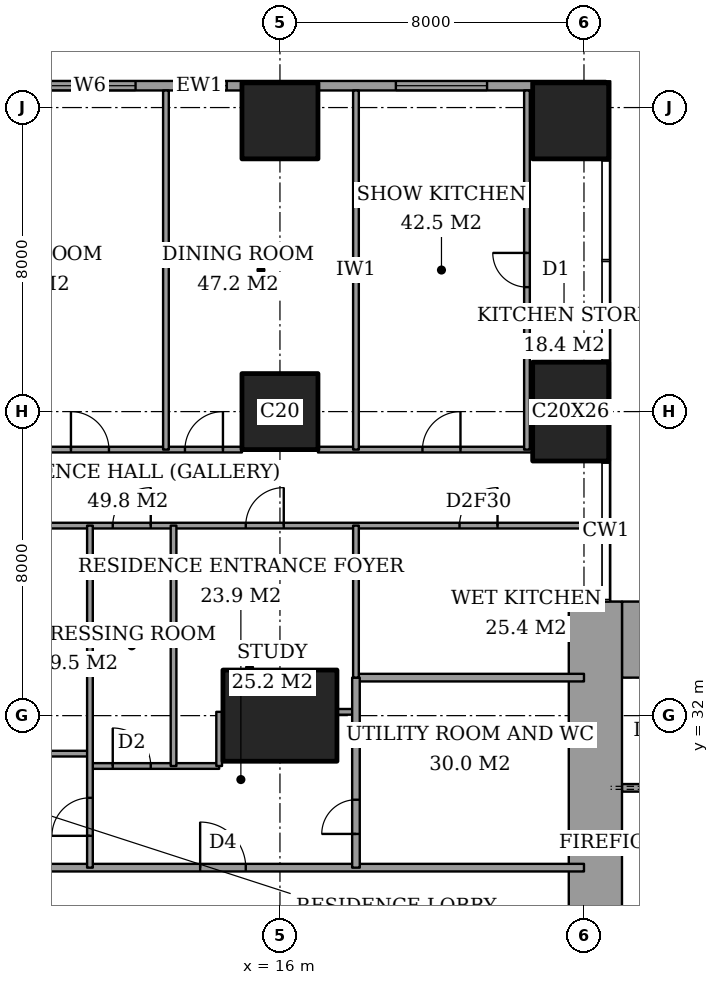
"""IFC4 building model, lengths in metres.
Left out: names, types, materials, properties, quantities, classifications, styles, units other than length and angle.
Written with IfcOpenShell. Run it as: python <this file> out.ifc"""

import sys

from ifc_helpers import new_model, si_unit, direction, frame, frame_2d, origin, origin_2d, place, context, subcontext, project, spatial, rectangle, extrude, element, fill, save


model = new_model("IFC4")
c1 = context("Model", 3, precision=1e-05, world=origin(), true_north=direction((0.0, 1.0)))
c2 = subcontext(c1, "Body", "Model", "MODEL_VIEW")
j1 = project(units=[si_unit("LENGTHUNIT", "METRE"), si_unit("PLANEANGLEUNIT", "RADIAN")], contexts=[c1])
p1 = place(None, origin())
s1 = spatial("IfcSite", under=j1, at=p1, CompositionType="ELEMENT")
p2 = place(p1, origin())
s2 = spatial("IfcBuilding", under=s1, at=p2, CompositionType="ELEMENT")
p3 = place(p2, frame((0.0, 0.0, 29.6)))
s3 = spatial("IfcBuildingStorey", under=s2, at=p3, CompositionType="ELEMENT", Elevation=29.6)
p4 = place(p3, frame((16.0, 32.0, 0.0), z_axis=(0.0, 0.0, 1.0), x_axis=(1.0, 0.0, 0.0)))
e1 = element("IfcColumn", 1, at=p4, inside=s3, PredefinedType="COLUMN", context=c2, shape_type="SweptSolid", body=[
    extrude(rectangle(XDim=3.0, YDim=2.4, at=origin_2d()), origin(), (0.0, 0.0, 1.0), 3.6),
])
for number, where, z_axis, x_axis in (
    (2, (16.0, 40.0, 0.0), (0.0, 0.0, 1.0), (1.0, 0.0, 0.0)),
    (3, (16.0, 47.65, 0.0), (0.0, 0.0, 1.0), (1.0, 0.0, 0.0)),
):
    element("IfcColumn", number, at=place(p3, frame(where, z_axis=z_axis, x_axis=x_axis)), inside=s3, PredefinedType="COLUMN", context=c2, shape_type="SweptSolid", body=[
        extrude(rectangle(XDim=2.0, YDim=2.0, at=origin_2d()), origin(), (0.0, 0.0, 1.0), 3.6),
    ])
p5 = place(p3, frame((23.65, 40.0, 0.0), z_axis=(0.0, 0.0, 1.0), x_axis=(1.0, 0.0, 0.0)))
e4 = element("IfcColumn", 4, at=p5, inside=s3, PredefinedType="COLUMN", context=c2, shape_type="SweptSolid", body=[
    extrude(rectangle(XDim=2.0, YDim=2.6, at=origin_2d()), origin(), (0.0, 0.0, 1.0), 3.6),
])
p6 = place(p3, frame((23.65, 47.65, 0.0), z_axis=(0.0, 0.0, 1.0), x_axis=(1.0, 0.0, 0.0)))
e5 = element("IfcColumn", 5, at=p6, inside=s3, PredefinedType="COLUMN", context=c2, shape_type="SweptSolid", body=[
    extrude(rectangle(XDim=2.0, YDim=2.0, at=origin_2d()), origin(), (0.0, 0.0, 1.0), 3.6),
])
p7 = place(p3, frame((25.0, 34.0, 0.0), z_axis=(0.0, 0.0, 1.0), x_axis=(1.0, 0.0, 0.0)))
e6 = element("IfcWall", 6, at=p7, inside=s3, PredefinedType="SHEAR", context=c2, shape_type="SweptSolid", body=[
    extrude(rectangle(XDim=3.15, YDim=2.0, at=frame_2d((1.575, 0.0))), origin(), (0.0, 0.0, 1.0), 3.6),
])
p8 = place(p3, frame((24.3, 23.15, 0.0), z_axis=(0.0, 0.0, 1.0), x_axis=(0.0, 1.0, 0.0)))
e7 = element("IfcWall", 7, at=p8, inside=s3, PredefinedType="SHEAR", context=c2, shape_type="SweptSolid", body=[
    extrude(rectangle(XDim=11.85, YDim=1.4, at=frame_2d((5.925, 0.0))), origin(), (0.0, 0.0, 1.0), 3.6),
])
p9 = place(p8, frame((0.75, 0.0, 0.0)))
e8 = element("IfcOpeningElement", 8, at=p9, cuts=e7, PredefinedType="OPENING", context=c2, shape_type="SweptSolid", body=[
    extrude(rectangle(XDim=1.8, YDim=2.4, at=frame_2d((0.9, 1.2))), frame((0.0, 0.71, 0.0), z_axis=(0.0, -1.0, 0.0), x_axis=(1.0, 0.0, 0.0)), (0.0, 0.0, 1.0), 1.42),
])
p10 = place(p3, frame((24.575, 48.575, 0.0), z_axis=(0.0, 0.0, 1.0), x_axis=(-1.0, 0.0, 0.0)))
e9 = element("IfcWall", 9, at=p10, inside=s3, PredefinedType="SOLIDWALL", context=c2, shape_type="SweptSolid", body=[
    extrude(rectangle(XDim=21.4, YDim=0.25, at=frame_2d((10.7, 0.0))), origin(), (0.0, 0.0, 1.0), 3.6),
])
p11 = place(p10, frame((3.125, 0.0, 0.6)))
e10 = element("IfcOpeningElement", 10, at=p11, cuts=e9, PredefinedType="OPENING", context=c2, shape_type="SweptSolid", body=[
    extrude(rectangle(XDim=2.4, YDim=2.0, at=frame_2d((1.2, 1.0))), frame((0.0, 0.135, 0.0), z_axis=(0.0, -1.0, 0.0), x_axis=(1.0, 0.0, 0.0)), (0.0, 0.0, 1.0), 0.27),
])
p12 = place(p10, frame((9.975, 0.0, 0.6)))
e11 = element("IfcOpeningElement", 11, at=p12, cuts=e9, PredefinedType="OPENING", context=c2, shape_type="SweptSolid", body=[
    extrude(rectangle(XDim=1.2, YDim=2.0, at=frame_2d((0.6, 1.0))), frame((0.0, 0.135, 0.0), z_axis=(0.0, -1.0, 0.0), x_axis=(1.0, 0.0, 0.0)), (0.0, 0.0, 1.0), 0.27),
])
p13 = place(p10, frame((12.375, 0.0, 0.6)))
e12 = element("IfcOpeningElement", 12, at=p13, cuts=e9, PredefinedType="OPENING", context=c2, shape_type="SweptSolid", body=[
    extrude(rectangle(XDim=2.4, YDim=2.0, at=frame_2d((1.2, 1.0))), frame((0.0, 0.135, 0.0), z_axis=(0.0, -1.0, 0.0), x_axis=(1.0, 0.0, 0.0)), (0.0, 0.0, 1.0), 0.27),
])
p14 = place(p10, frame((19.425, 0.0, 0.6)))
e13 = element("IfcOpeningElement", 13, at=p14, cuts=e9, PredefinedType="OPENING", context=c2, shape_type="SweptSolid", body=[
    extrude(rectangle(XDim=1.2, YDim=2.0, at=frame_2d((0.6, 1.0))), frame((0.0, 0.135, 0.0), z_axis=(0.0, -1.0, 0.0), x_axis=(1.0, 0.0, 0.0)), (0.0, 0.0, 1.0), 0.27),
])
p15 = place(p3, frame((6.725, 28.0, 0.0), z_axis=(0.0, 0.0, 1.0), x_axis=(1.0, 0.0, 0.0)))
e14 = element("IfcWall", 14, at=p15, inside=s3, PredefinedType="PARTITIONING", context=c2, shape_type="SweptSolid", body=[
    extrude(rectangle(XDim=17.275, YDim=0.2, at=frame_2d((8.637, 0.0))), origin(), (0.0, 0.0, 1.0), 3.35),
])
p16 = place(p15, frame((7.175, 0.0, 0.0)))
e15 = element("IfcOpeningElement", 15, at=p16, cuts=e14, PredefinedType="OPENING", context=c2, shape_type="SweptSolid", body=[
    extrude(rectangle(XDim=1.2, YDim=2.4, at=frame_2d((0.6, 1.2))), frame((0.0, 0.11, 0.0), z_axis=(0.0, -1.0, 0.0), x_axis=(1.0, 0.0, 0.0)), (0.0, 0.0, 1.0), 0.22),
])
p17 = place(p3, frame((11.0, 30.675, 0.0), z_axis=(0.0, 0.0, 1.0), x_axis=(1.0, 0.0, 0.0)))
e16 = element("IfcWall", 16, at=p17, inside=s3, PredefinedType="PARTITIONING", context=c2, shape_type="SweptSolid", body=[
    extrude(rectangle(XDim=3.4, YDim=0.15, at=frame_2d((1.7, 0.0))), origin(), (0.0, 0.0, 1.0), 3.35),
])
p18 = place(p17, frame((0.6, 0.0, 0.0)))
e17 = element("IfcOpeningElement", 17, at=p18, cuts=e16, PredefinedType="OPENING", context=c2, shape_type="SweptSolid", body=[
    extrude(rectangle(XDim=1.0, YDim=2.1, at=frame_2d((0.5, 1.05))), frame((0.0, 0.085, 0.0), z_axis=(0.0, -1.0, 0.0), x_axis=(1.0, 0.0, 0.0)), (0.0, 0.0, 1.0), 0.17),
])
p19 = place(p3, frame((9.5, 31.0, 0.0), z_axis=(0.0, 0.0, 1.0), x_axis=(1.0, 0.0, 0.0)))
e18 = element("IfcWall", 18, at=p19, inside=s3, PredefinedType="PARTITIONING", context=c2, shape_type="SweptSolid", body=[
    extrude(rectangle(XDim=1.5, YDim=0.15, at=frame_2d((0.75, 0.0))), origin(), (0.0, 0.0, 1.0), 3.35),
])
p20 = place(p3, frame((17.5, 32.1, 0.0), z_axis=(0.0, 0.0, 1.0), x_axis=(1.0, 0.0, 0.0)))
e19 = element("IfcWall", 19, at=p20, inside=s3, PredefinedType="PARTITIONING", context=c2, shape_type="SweptSolid", body=[
    extrude(rectangle(XDim=0.5, YDim=0.15, at=frame_2d((0.25, 0.0))), origin(), (0.0, 0.0, 1.0), 2.634),
])
p21 = place(p3, frame((18.0, 33.0, 0.0), z_axis=(0.0, 0.0, 1.0), x_axis=(1.0, 0.0, 0.0)))
e20 = element("IfcWall", 20, at=p21, inside=s3, PredefinedType="PARTITIONING", context=c2, shape_type="SweptSolid", body=[
    extrude(rectangle(XDim=6.0, YDim=0.2, at=frame_2d((3.0, 0.0))), origin(), (0.0, 0.0, 1.0), 3.35),
])
p22 = place(p3, frame((-0.45, 37.0, 0.0), z_axis=(0.0, 0.0, 1.0), x_axis=(1.0, 0.0, 0.0)))
e21 = element("IfcWall", 21, at=p22, inside=s3, PredefinedType="PARTITIONING", context=c2, shape_type="SweptSolid", body=[
    extrude(rectangle(XDim=25.011, YDim=0.15, at=frame_2d((12.505, 0.0))), origin(), (0.0, 0.0, 1.0), 3.35),
])
p23 = place(p22, frame((12.05, 0.0, 0.0)))
e22 = element("IfcOpeningElement", 22, at=p23, cuts=e21, PredefinedType="OPENING", context=c2, shape_type="SweptSolid", body=[
    extrude(rectangle(XDim=1.0, YDim=2.1, at=frame_2d((0.5, 1.05))), frame((0.0, 0.085, 0.0), z_axis=(0.0, -1.0, 0.0), x_axis=(1.0, 0.0, 0.0)), (0.0, 0.0, 1.0), 0.17),
])
p24 = place(p22, frame((3.087, 0.0, 0.0)))
e23 = element("IfcOpeningElement", 23, at=p24, cuts=e21, PredefinedType="OPENING", context=c2, shape_type="SweptSolid", body=[
    extrude(rectangle(XDim=1.0, YDim=2.1, at=frame_2d((0.5, 1.05))), frame((0.0, 0.085, 0.0), z_axis=(0.0, -1.0, 0.0), x_axis=(1.0, 0.0, 0.0)), (0.0, 0.0, 1.0), 0.17),
])
p25 = place(p22, frame((15.55, 0.0, 0.0)))
e24 = element("IfcOpeningElement", 24, at=p25, cuts=e21, PredefinedType="OPENING", context=c2, shape_type="SweptSolid", body=[
    extrude(rectangle(XDim=1.0, YDim=2.1, at=frame_2d((0.5, 1.05))), frame((0.0, 0.085, 0.0), z_axis=(0.0, -1.0, 0.0), x_axis=(1.0, 0.0, 0.0)), (0.0, 0.0, 1.0), 0.17),
])
p26 = place(p22, frame((21.175, 0.0, 0.0)))
e25 = element("IfcOpeningElement", 25, at=p26, cuts=e21, PredefinedType="OPENING", context=c2, shape_type="SweptSolid", body=[
    extrude(rectangle(XDim=1.0, YDim=2.1, at=frame_2d((0.5, 1.05))), frame((0.0, 0.085, 0.0), z_axis=(0.0, -1.0, 0.0), x_axis=(1.0, 0.0, 0.0)), (0.0, 0.0, 1.0), 0.17),
])
p27 = place(p3, frame((9.0, 39.0, 0.0), z_axis=(0.0, 0.0, 1.0), x_axis=(1.0, 0.0, 0.0)))
e26 = element("IfcWall", 26, at=p27, inside=s3, PredefinedType="PARTITIONING", context=c2, shape_type="SweptSolid", body=[
    extrude(rectangle(XDim=6.0, YDim=0.15, at=frame_2d((3.0, 0.0))), origin(), (0.0, 0.0, 1.0), 3.35),
])
p28 = place(p27, frame((1.5, 0.0, 0.0)))
e27 = element("IfcOpeningElement", 27, at=p28, cuts=e26, PredefinedType="OPENING", context=c2, shape_type="SweptSolid", body=[
    extrude(rectangle(XDim=1.0, YDim=2.1, at=frame_2d((0.5, 1.05))), frame((0.0, 0.085, 0.0), z_axis=(0.0, -1.0, 0.0), x_axis=(1.0, 0.0, 0.0)), (0.0, 0.0, 1.0), 0.17),
])
p29 = place(p27, frame((4.5, 0.0, 0.0)))
e28 = element("IfcOpeningElement", 28, at=p29, cuts=e26, PredefinedType="OPENING", context=c2, shape_type="SweptSolid", body=[
    extrude(rectangle(XDim=1.0, YDim=2.1, at=frame_2d((0.5, 1.05))), frame((0.0, 0.085, 0.0), z_axis=(0.0, -1.0, 0.0), x_axis=(1.0, 0.0, 0.0)), (0.0, 0.0, 1.0), 0.17),
])
p30 = place(p3, frame((17.0, 39.0, 0.0), z_axis=(0.0, 0.0, 1.0), x_axis=(1.0, 0.0, 0.0)))
e29 = element("IfcWall", 29, at=p30, inside=s3, PredefinedType="PARTITIONING", context=c2, shape_type="SweptSolid", body=[
    extrude(rectangle(XDim=5.65, YDim=0.15, at=frame_2d((2.825, 0.0))), origin(), (0.0, 0.0, 1.0), 3.35),
])
p31 = place(p30, frame((2.75, 0.0, 0.0)))
e30 = element("IfcOpeningElement", 30, at=p31, cuts=e29, PredefinedType="OPENING", context=c2, shape_type="SweptSolid", body=[
    extrude(rectangle(XDim=1.0, YDim=2.1, at=frame_2d((0.5, 1.05))), frame((0.0, 0.085, 0.0), z_axis=(0.0, -1.0, 0.0), x_axis=(1.0, 0.0, 0.0)), (0.0, 0.0, 1.0), 0.17),
])
p32 = place(p3, frame((11.0, 28.0, 0.0), z_axis=(0.0, 0.0, 1.0), x_axis=(0.0, 1.0, 0.0)))
e31 = element("IfcWall", 31, at=p32, inside=s3, PredefinedType="PARTITIONING", context=c2, shape_type="SweptSolid", body=[
    extrude(rectangle(XDim=9.0, YDim=0.15, at=frame_2d((4.5, 0.0))), origin(), (0.0, 0.0, 1.0), 3.35),
])
p33 = place(p32, frame((0.837, 0.0, 0.0)))
e32 = element("IfcOpeningElement", 32, at=p33, cuts=e31, PredefinedType="OPENING", context=c2, shape_type="SweptSolid", body=[
    extrude(rectangle(XDim=1.0, YDim=2.1, at=frame_2d((0.5, 1.05))), frame((0.0, 0.085, 0.0), z_axis=(0.0, -1.0, 0.0), x_axis=(1.0, 0.0, 0.0)), (0.0, 0.0, 1.0), 0.17),
])
p34 = place(p3, frame((13.0, 39.0, 0.0), z_axis=(0.0, 0.0, 1.0), x_axis=(0.0, 1.0, 0.0)))
e33 = element("IfcWall", 33, at=p34, inside=s3, PredefinedType="PARTITIONING", context=c2, shape_type="SweptSolid", body=[
    extrude(rectangle(XDim=9.45, YDim=0.15, at=frame_2d((4.725, 0.0))), origin(), (0.0, 0.0, 1.0), 3.35),
])
p35 = place(p3, frame((13.2, 30.675, 0.0), z_axis=(0.0, 0.0, 1.0), x_axis=(0.0, 1.0, 0.0)))
e34 = element("IfcWall", 34, at=p35, inside=s3, PredefinedType="PARTITIONING", context=c2, shape_type="SweptSolid", body=[
    extrude(rectangle(XDim=6.325, YDim=0.15, at=frame_2d((3.163, 0.0))), origin(), (0.0, 0.0, 1.0), 3.35),
])
p36 = place(p3, frame((14.4, 30.675, 0.0), z_axis=(0.0, 0.0, 1.0), x_axis=(0.0, 1.0, 0.0)))
e35 = element("IfcWall", 35, at=p36, inside=s3, PredefinedType="PARTITIONING", context=c2, shape_type="SweptSolid", body=[
    extrude(rectangle(XDim=1.425, YDim=0.15, at=frame_2d((0.712, 0.0))), origin(), (0.0, 0.0, 1.0), 3.35),
])
p37 = place(p3, frame((18.0, 28.0, 0.0), z_axis=(0.0, 0.0, 1.0), x_axis=(0.0, 1.0, 0.0)))
e36 = element("IfcWall", 36, at=p37, inside=s3, PredefinedType="PARTITIONING", context=c2, shape_type="SweptSolid", body=[
    extrude(rectangle(XDim=5.0, YDim=0.2, at=frame_2d((2.5, 0.0))), origin(), (0.0, 0.0, 1.0), 3.35),
])
p38 = place(p37, frame((0.887, 0.0, 0.0)))
e37 = element("IfcOpeningElement", 37, at=p38, cuts=e36, PredefinedType="OPENING", context=c2, shape_type="SweptSolid", body=[
    extrude(rectangle(XDim=0.9, YDim=2.1, at=frame_2d((0.45, 1.05))), frame((0.0, 0.11, 0.0), z_axis=(0.0, -1.0, 0.0), x_axis=(1.0, 0.0, 0.0)), (0.0, 0.0, 1.0), 0.22),
])
p39 = place(p3, frame((18.0, 33.0, 0.0), z_axis=(0.0, 0.0, 1.0), x_axis=(0.0, 1.0, 0.0)))
e38 = element("IfcWall", 38, at=p39, inside=s3, PredefinedType="PARTITIONING", context=c2, shape_type="SweptSolid", body=[
    extrude(rectangle(XDim=4.0, YDim=0.15, at=frame_2d((2.0, 0.0))), origin(), (0.0, 0.0, 1.0), 3.35),
])
p40 = place(p3, frame((18.0, 39.0, 0.0), z_axis=(0.0, 0.0, 1.0), x_axis=(0.0, 1.0, 0.0)))
e39 = element("IfcWall", 39, at=p40, inside=s3, PredefinedType="PARTITIONING", context=c2, shape_type="SweptSolid", body=[
    extrude(rectangle(XDim=9.45, YDim=0.15, at=frame_2d((4.725, 0.0))), origin(), (0.0, 0.0, 1.0), 3.35),
])
p41 = place(p3, frame((22.5, 39.0, 0.0), z_axis=(0.0, 0.0, 1.0), x_axis=(0.0, 1.0, 0.0)))
e40 = element("IfcWall", 40, at=p41, inside=s3, PredefinedType="PARTITIONING", context=c2, shape_type="SweptSolid", body=[
    extrude(rectangle(XDim=9.45, YDim=0.15, at=frame_2d((4.725, 0.0))), origin(), (0.0, 0.0, 1.0), 3.35),
])
p42 = place(p41, frame((4.275, 0.0, 0.0)))
e41 = element("IfcOpeningElement", 41, at=p42, cuts=e40, PredefinedType="OPENING", context=c2, shape_type="SweptSolid", body=[
    extrude(rectangle(XDim=0.9, YDim=2.1, at=frame_2d((0.45, 1.05))), frame((0.0, 0.085, 0.0), z_axis=(0.0, -1.0, 0.0), x_axis=(1.0, 0.0, 0.0)), (0.0, 0.0, 1.0), 0.17),
])
p43 = place(p3, frame((25.0, 30.1, 0.0), z_axis=(0.0, 0.0, 1.0), x_axis=(1.0, 0.0, 0.0)))
e42 = element("IfcWall", 42, at=p43, inside=s3, PredefinedType="PARTITIONING", context=c2, shape_type="SweptSolid", body=[
    extrude(rectangle(XDim=12.7, YDim=0.2, at=frame_2d((6.35, 0.0))), origin(), (0.0, 0.0, 1.0), 3.6),
])
p44 = place(p43, frame((0.9, 0.0, 0.0)))
e43 = element("IfcOpeningElement", 43, at=p44, cuts=e42, PredefinedType="OPENING", context=c2, shape_type="SweptSolid", body=[
    extrude(rectangle(XDim=1.2, YDim=2.1, at=frame_2d((0.6, 1.05))), frame((0.0, 0.11, 0.0), z_axis=(0.0, -1.0, 0.0), x_axis=(1.0, 0.0, 0.0)), (0.0, 0.0, 1.0), 0.22),
])
p45 = place(p11, origin())
e44 = element("IfcWindow", 44, at=p45, inside=s3, PartitioningType="SINGLE_PANEL", PredefinedType="WINDOW", context=c2, shape_type="SweptSolid", body=[
    extrude(rectangle(XDim=2.4, YDim=2.0, at=frame_2d((1.2, 1.0))), frame((0.0, 0.03, 0.0), z_axis=(0.0, -1.0, 0.0), x_axis=(1.0, 0.0, 0.0)), (0.0, 0.0, 1.0), 0.06),
])
fill(e10, e44)
p46 = place(p12, origin())
e45 = element("IfcWindow", 45, at=p46, inside=s3, PartitioningType="SINGLE_PANEL", PredefinedType="WINDOW", context=c2, shape_type="SweptSolid", body=[
    extrude(rectangle(XDim=1.2, YDim=2.0, at=frame_2d((0.6, 1.0))), frame((0.0, 0.03, 0.0), z_axis=(0.0, -1.0, 0.0), x_axis=(1.0, 0.0, 0.0)), (0.0, 0.0, 1.0), 0.06),
])
fill(e11, e45)
p47 = place(p13, origin())
e46 = element("IfcWindow", 46, at=p47, inside=s3, PartitioningType="SINGLE_PANEL", PredefinedType="WINDOW", context=c2, shape_type="SweptSolid", body=[
    extrude(rectangle(XDim=2.4, YDim=2.0, at=frame_2d((1.2, 1.0))), frame((0.0, 0.03, 0.0), z_axis=(0.0, -1.0, 0.0), x_axis=(1.0, 0.0, 0.0)), (0.0, 0.0, 1.0), 0.06),
])
fill(e12, e46)
p48 = place(p28, origin())
e47 = element("IfcDoor", 47, at=p48, inside=s3, OperationType="SINGLE_SWING_RIGHT", PredefinedType="DOOR", context=c2, shape_type="SweptSolid", body=[
    extrude(rectangle(XDim=1.0, YDim=2.1, at=frame_2d((0.5, 1.05))), frame((0.0, 0.025, 0.0), z_axis=(0.0, -1.0, 0.0), x_axis=(1.0, 0.0, 0.0)), (0.0, 0.0, 1.0), 0.05),
])
fill(e27, e47)
p49 = place(p29, origin())
e48 = element("IfcDoor", 48, at=p49, inside=s3, OperationType="SINGLE_SWING_LEFT", PredefinedType="DOOR", context=c2, shape_type="SweptSolid", body=[
    extrude(rectangle(XDim=1.0, YDim=2.1, at=frame_2d((0.5, 1.05))), frame((0.0, 0.025, 0.0), z_axis=(0.0, -1.0, 0.0), x_axis=(1.0, 0.0, 0.0)), (0.0, 0.0, 1.0), 0.05),
])
fill(e28, e48)
p50 = place(p31, origin())
e49 = element("IfcDoor", 49, at=p50, inside=s3, OperationType="SINGLE_SWING_LEFT", PredefinedType="DOOR", context=c2, shape_type="SweptSolid", body=[
    extrude(rectangle(XDim=1.0, YDim=2.1, at=frame_2d((0.5, 1.05))), frame((0.0, 0.025, 0.0), z_axis=(0.0, -1.0, 0.0), x_axis=(1.0, 0.0, 0.0)), (0.0, 0.0, 1.0), 0.05),
])
fill(e30, e49)
p51 = place(p42, origin())
e50 = element("IfcDoor", 50, at=p51, inside=s3, OperationType="SINGLE_SWING_LEFT", PredefinedType="DOOR", context=c2, shape_type="SweptSolid", body=[
    extrude(rectangle(XDim=0.9, YDim=2.1, at=frame_2d((0.45, 1.05))), frame((0.0, 0.025, 0.0), z_axis=(0.0, -1.0, 0.0), x_axis=(1.0, 0.0, 0.0)), (0.0, 0.0, 1.0), 0.05),
])
fill(e41, e50)
p52 = place(p23, origin())
e51 = element("IfcDoor", 51, at=p52, inside=s3, OperationType="SINGLE_SWING_LEFT", PredefinedType="DOOR", context=c2, shape_type="SweptSolid", body=[
    extrude(rectangle(XDim=1.0, YDim=2.1, at=frame_2d((0.5, 1.05))), frame((0.0, 0.025, 0.0), z_axis=(0.0, -1.0, 0.0), x_axis=(1.0, 0.0, 0.0)), (0.0, 0.0, 1.0), 0.05),
])
fill(e22, e51)
p53 = place(p33, origin())
e52 = element("IfcDoor", 52, at=p53, inside=s3, OperationType="SINGLE_SWING_RIGHT", PredefinedType="DOOR", context=c2, shape_type="SweptSolid", body=[
    extrude(rectangle(XDim=1.0, YDim=2.1, at=frame_2d((0.5, 1.05))), frame((0.0, 0.025, 0.0), z_axis=(0.0, -1.0, 0.0), x_axis=(1.0, 0.0, 0.0)), (0.0, 0.0, 1.0), 0.05),
])
fill(e32, e52)
p54 = place(p16, origin())
e53 = element("IfcDoor", 53, at=p54, inside=s3, OperationType="SINGLE_SWING_RIGHT", PredefinedType="DOOR", context=c2, shape_type="SweptSolid", body=[
    extrude(rectangle(XDim=1.2, YDim=2.4, at=frame_2d((0.6, 1.2))), frame((0.0, 0.025, 0.0), z_axis=(0.0, -1.0, 0.0), x_axis=(1.0, 0.0, 0.0)), (0.0, 0.0, 1.0), 0.05),
])
fill(e15, e53)
p55 = place(p18, origin())
e54 = element("IfcDoor", 54, at=p55, inside=s3, OperationType="SINGLE_SWING_RIGHT", PredefinedType="DOOR", context=c2, shape_type="SweptSolid", body=[
    extrude(rectangle(XDim=1.0, YDim=2.1, at=frame_2d((0.5, 1.05))), frame((0.0, 0.025, 0.0), z_axis=(0.0, -1.0, 0.0), x_axis=(1.0, 0.0, 0.0)), (0.0, 0.0, 1.0), 0.05),
])
fill(e17, e54)
p56 = place(p25, origin())
e55 = element("IfcDoor", 55, at=p56, inside=s3, OperationType="SINGLE_SWING_LEFT", PredefinedType="DOOR", context=c2, shape_type="SweptSolid", body=[
    extrude(rectangle(XDim=1.0, YDim=2.1, at=frame_2d((0.5, 1.05))), frame((0.0, 0.025, 0.0), z_axis=(0.0, -1.0, 0.0), x_axis=(1.0, 0.0, 0.0)), (0.0, 0.0, 1.0), 0.05),
])
fill(e24, e55)
p57 = place(p26, origin())
e56 = element("IfcDoor", 56, at=p57, inside=s3, OperationType="SINGLE_SWING_LEFT", PredefinedType="DOOR", context=c2, shape_type="SweptSolid", body=[
    extrude(rectangle(XDim=1.0, YDim=2.1, at=frame_2d((0.5, 1.05))), frame((0.0, 0.025, 0.0), z_axis=(0.0, -1.0, 0.0), x_axis=(1.0, 0.0, 0.0)), (0.0, 0.0, 1.0), 0.05),
])
fill(e25, e56)
p58 = place(p38, origin())
e57 = element("IfcDoor", 57, at=p58, inside=s3, OperationType="SINGLE_SWING_RIGHT", PredefinedType="DOOR", context=c2, shape_type="SweptSolid", body=[
    extrude(rectangle(XDim=0.9, YDim=2.1, at=frame_2d((0.45, 1.05))), frame((0.0, 0.025, 0.0), z_axis=(0.0, -1.0, 0.0), x_axis=(1.0, 0.0, 0.0)), (0.0, 0.0, 1.0), 0.05),
])
fill(e37, e57)
save(model, sys.argv[1])
